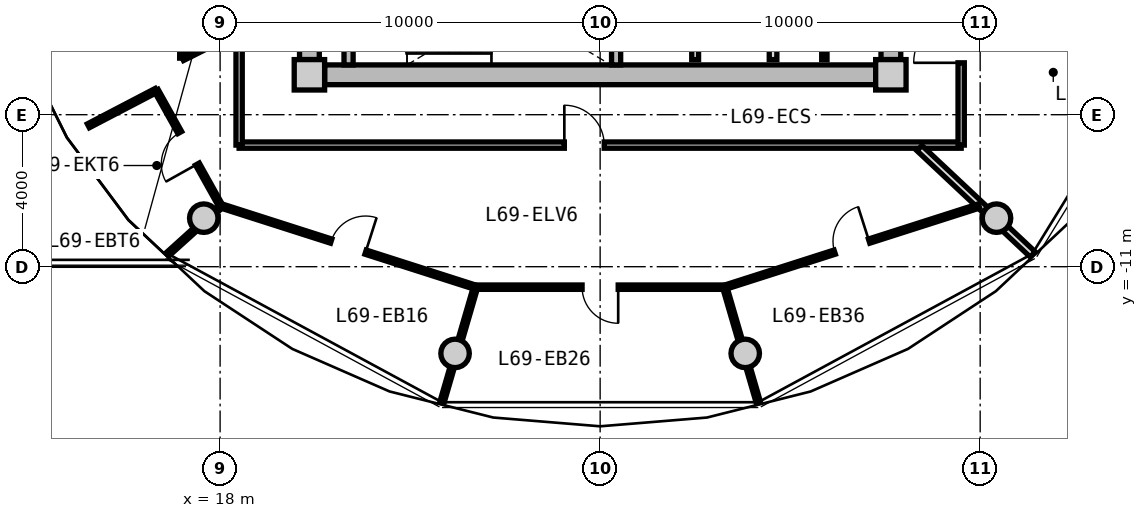
"""IFC4 building model, lengths in metres.
Left out: names, types, materials, properties, quantities, classifications, styles, units other than length and angle.
Written with IfcOpenShell. Run it as: python <this file> out.ifc"""

import sys

from ifc_helpers import new_model, si_unit, direction, frame, frame_2d, origin, origin_2d, place, context, subcontext, project, spatial, rectangle, circle, extrude, source, transform, mapped, element, fill, save


model = new_model("IFC4")
c1 = context("Model", 3, precision=1e-05, world=origin(), true_north=direction((0.0, 1.0)))
c2 = subcontext(c1, "Body", "Model", "MODEL_VIEW")
j1 = project(units=[si_unit("LENGTHUNIT", "METRE"), si_unit("PLANEANGLEUNIT", "RADIAN")], contexts=[c1])
p1 = place(None, origin())
s1 = spatial("IfcSite", under=j1, at=p1, CompositionType="ELEMENT")
p2 = place(p1, origin())
s2 = spatial("IfcBuilding", under=s1, at=p2, CompositionType="ELEMENT")
p3 = place(p2, frame((0.0, 0.0, 223.05)))
s3 = spatial("IfcBuildingStorey", under=s2, at=p3, CompositionType="ELEMENT", Elevation=223.05)
m1 = source(origin(), c2, "Body", "SweptSolid", [
    extrude(rectangle(XDim=0.8, YDim=0.8, at=origin_2d()), origin(), (0.0, 0.0, 1.0), 3.05),
])
for number, where, z_axis, x_axis in (
    (1, (20.35, -5.95, 0.0), (0.0, 0.0, 1.0), (1.0, 0.0, 0.0)),
    (2, (35.65, -5.95, 0.0), (0.0, 0.0, 1.0), (1.0, 0.0, 0.0)),
):
    element("IfcColumn", number, at=place(p3, frame(where, z_axis=z_axis, x_axis=x_axis)), inside=s3, PredefinedType="COLUMN", context=c2, shape_type="MappedRepresentation", body=[
        mapped(m1, transform((0.0, 0.0, 0.0), x_axis=(1.0, 0.0, 0.0), y_axis=(0.0, 1.0, 0.0), z_axis=(0.0, 0.0, 1.0), scale=1.0)),
    ])
m2 = source(origin(), c2, "Body", "SweptSolid", [
    extrude(rectangle(XDim=14.5, YDim=0.52, at=frame_2d((7.25, 0.0))), origin(), (0.0, 0.0, 1.0), 2.76),
])
p4 = place(p3, frame((35.25, -5.95, 0.0), z_axis=(0.0, 0.0, 1.0), x_axis=(-1.0, 0.0, 0.0)))
e3 = element("IfcWall", 3, at=p4, inside=s3, PredefinedType="SHEAR", context=c2, shape_type="MappedRepresentation", body=[
    mapped(m2, transform((0.0, 0.0, 0.0), x_axis=(1.0, 0.0, 0.0), y_axis=(0.0, 1.0, 0.0), z_axis=(0.0, 0.0, 1.0), scale=1.0)),
])
m3 = source(origin(), c2, "Body", "SweptSolid", [
    extrude(rectangle(XDim=11.1, YDim=0.52, at=frame_2d((5.55, 0.0))), origin(), (0.0, 0.0, 1.0), 2.76),
])
p5 = place(p3, frame((20.35, -5.55, 0.0), z_axis=(0.0, 0.0, 1.0), x_axis=(0.0, 1.0, 0.0)))
e4 = element("IfcWall", 4, at=p5, inside=s3, PredefinedType="SHEAR", context=c2, shape_type="MappedRepresentation", body=[
    mapped(m3, transform((0.0, 0.0, 0.0), x_axis=(1.0, 0.0, 0.0), y_axis=(0.0, 1.0, 0.0), z_axis=(0.0, 0.0, 1.0), scale=1.0)),
])
p6 = place(p5, frame((3.8, 0.0, 0.0)))
e5 = element("IfcOpeningElement", 5, at=p6, cuts=e4, PredefinedType="OPENING", context=c2, shape_type="SweptSolid", body=[
    extrude(rectangle(XDim=1.2, YDim=2.15, at=frame_2d((0.6, 1.075))), frame((0.0, 0.27, 0.0), z_axis=(0.0, -1.0, 0.0), x_axis=(1.0, 0.0, 0.0)), (0.0, 0.0, 1.0), 0.54),
])
p7 = place(p3, frame((35.65, 5.55, 0.0), z_axis=(0.0, 0.0, 1.0), x_axis=(0.0, -1.0, 0.0)))
e6 = element("IfcWall", 6, at=p7, inside=s3, PredefinedType="SHEAR", context=c2, shape_type="MappedRepresentation", body=[
    mapped(m3, transform((0.0, 0.0, 0.0), x_axis=(1.0, 0.0, 0.0), y_axis=(0.0, 1.0, 0.0), z_axis=(0.0, 0.0, 1.0), scale=1.0)),
])
p8 = place(p7, frame((5.65, 0.0, 0.0)))
e7 = element("IfcOpeningElement", 7, at=p8, cuts=e6, PredefinedType="OPENING", context=c2, shape_type="SweptSolid", body=[
    extrude(rectangle(XDim=1.2, YDim=2.15, at=frame_2d((0.6, 1.075))), frame((0.0, 0.27, 0.0), z_axis=(0.0, -1.0, 0.0), x_axis=(1.0, 0.0, 0.0)), (0.0, 0.0, 1.0), 0.54),
])
m4 = source(origin(), c2, "Body", "SweptSolid", [
    extrude(circle(Radius=0.375, at=origin_2d()), origin(), (0.0, 0.0, 1.0), 3.05),
])
for number, where, z_axis, x_axis in (
    (8, (17.57, -9.723, 0.0), (0.0, 0.0, 1.0), (1.0, 0.0, 0.0)),
    (9, (24.182, -13.281, 0.0), (0.0, 0.0, 1.0), (1.0, 0.0, 0.0)),
    (10, (31.818, -13.281, 0.0), (0.0, 0.0, 1.0), (1.0, 0.0, 0.0)),
    (11, (38.43, -9.723, 0.0), (0.0, 0.0, 1.0), (1.0, 0.0, 0.0)),
):
    element("IfcColumn", number, at=place(p3, frame(where, z_axis=z_axis, x_axis=x_axis)), inside=s3, PredefinedType="COLUMN", context=c2, shape_type="MappedRepresentation", body=[
        mapped(m4, transform((0.0, 0.0, 0.0), x_axis=(1.0, 0.0, 0.0), y_axis=(0.0, 1.0, 0.0), z_axis=(0.0, 0.0, 1.0), scale=1.0)),
    ])
m5 = source(origin(), c2, "Body", "SweptSolid", [
    extrude(rectangle(XDim=3.24, YDim=0.24, at=frame_2d((1.62, 0.0))), origin(), (0.0, 0.0, 1.0), 2.76),
])
for number, where, z_axis, x_axis in (
    (12, (21.38, -5.69, 0.0), (0.0, 0.0, 1.0), (0.0, 1.0, 0.0)),
    (13, (28.42, -5.69, 0.0), (0.0, 0.0, 1.0), (0.0, 1.0, 0.0)),
):
    element("IfcWall", number, at=place(p3, frame(where, z_axis=z_axis, x_axis=x_axis)), inside=s3, PredefinedType="PARTITIONING", context=c2, shape_type="MappedRepresentation", body=[
        mapped(m5, transform((0.0, 0.0, 0.0), x_axis=(1.0, 0.0, 0.0), y_axis=(0.0, 1.0, 0.0), z_axis=(0.0, 0.0, 1.0), scale=1.0)),
    ])
m6 = source(origin(), c2, "Body", "SweptSolid", [
    extrude(rectangle(XDim=3.8, YDim=0.2, at=frame_2d((1.9, 0.0))), origin(), (0.0, 0.0, 1.0), 2.745),
])
p9 = place(p3, frame((32.55, -5.55, 0.0), z_axis=(0.0, 0.0, 1.0), x_axis=(0.0, 1.0, 0.0)))
e14 = element("IfcWall", 14, at=p9, inside=s3, PredefinedType="PARTITIONING", context=c2, shape_type="MappedRepresentation", body=[
    mapped(m6, transform((0.0, 0.0, 0.0), x_axis=(1.0, 0.0, 0.0), y_axis=(0.0, 1.0, 0.0), z_axis=(0.0, 0.0, 1.0), scale=1.0)),
])
m7 = source(origin(), c2, "Body", "SweptSolid", [
    extrude(rectangle(XDim=4.2, YDim=0.18, at=frame_2d((2.1, 0.0))), origin(), (0.0, 0.0, 1.0), 2.745),
])
p10 = place(p3, frame((30.5, -5.55, 0.0), z_axis=(0.0, 0.0, 1.0), x_axis=(0.0, 1.0, 0.0)))
e15 = element("IfcWall", 15, at=p10, inside=s3, PredefinedType="PARTITIONING", context=c2, shape_type="MappedRepresentation", body=[
    mapped(m7, transform((0.0, 0.0, 0.0), x_axis=(1.0, 0.0, 0.0), y_axis=(0.0, 1.0, 0.0), z_axis=(0.0, 0.0, 1.0), scale=1.0)),
])
m8 = source(origin(), c2, "Body", "SweptSolid", [
    extrude(rectangle(XDim=3.8, YDim=0.14, at=frame_2d((1.9, 0.0))), origin(), (0.0, 0.0, 1.0), 2.745),
])
p11 = place(p3, frame((33.9, -5.55, 0.0), z_axis=(0.0, 0.0, 1.0), x_axis=(0.0, 1.0, 0.0)))
e16 = element("IfcWall", 16, at=p11, inside=s3, PredefinedType="PARTITIONING", context=c2, shape_type="MappedRepresentation", body=[
    mapped(m8, transform((0.0, 0.0, 0.0), x_axis=(1.0, 0.0, 0.0), y_axis=(0.0, 1.0, 0.0), z_axis=(0.0, 0.0, 1.0), scale=1.0)),
])
m9 = source(origin(), c2, "Body", "SweptSolid", [
    extrude(rectangle(XDim=19.0, YDim=0.165, at=frame_2d((9.5, 0.0))), origin(), (0.0, 0.0, 1.0), 2.745),
])
p12 = place(p3, frame((37.5, -7.8, 0.0), z_axis=(0.0, 0.0, 1.0), x_axis=(-1.0, 0.0, 0.0)))
e17 = element("IfcWall", 17, at=p12, inside=s3, PredefinedType="PARTITIONING", context=c2, shape_type="MappedRepresentation", body=[
    mapped(m9, transform((0.0, 0.0, 0.0), x_axis=(1.0, 0.0, 0.0), y_axis=(0.0, 1.0, 0.0), z_axis=(0.0, 0.0, 1.0), scale=1.0)),
])
p13 = place(p12, frame((9.392, 0.0, 0.0)))
e18 = element("IfcOpeningElement", 18, at=p13, cuts=e17, PredefinedType="OPENING", context=c2, shape_type="SweptSolid", body=[
    extrude(rectangle(XDim=1.05, YDim=2.15, at=frame_2d((0.525, 1.075))), frame((0.0, 0.093, 0.0), z_axis=(0.0, -1.0, 0.0), x_axis=(1.0, 0.0, 0.0)), (0.0, 0.0, 1.0), 0.185),
])
m10 = source(origin(), c2, "Body", "SweptSolid", [
    extrude(rectangle(XDim=6.88, YDim=0.165, at=frame_2d((3.44, 0.0))), origin(), (0.0, 0.0, 1.0), 2.745),
])
p14 = place(p3, frame((18.5, -7.8, 0.0), z_axis=(0.0, 0.0, 1.0), x_axis=(0.0, 1.0, 0.0)))
e19 = element("IfcWall", 19, at=p14, inside=s3, PredefinedType="PARTITIONING", context=c2, shape_type="MappedRepresentation", body=[
    mapped(m10, transform((0.0, 0.0, 0.0), x_axis=(1.0, 0.0, 0.0), y_axis=(0.0, 1.0, 0.0), z_axis=(0.0, 0.0, 1.0), scale=1.0)),
])
p15 = place(p3, frame((37.5, -0.92, 0.0), z_axis=(0.0, 0.0, 1.0), x_axis=(0.0, -1.0, 0.0)))
e20 = element("IfcWall", 20, at=p15, inside=s3, PredefinedType="PARTITIONING", context=c2, shape_type="MappedRepresentation", body=[
    mapped(m10, transform((0.0, 0.0, 0.0), x_axis=(1.0, 0.0, 0.0), y_axis=(0.0, 1.0, 0.0), z_axis=(0.0, 0.0, 1.0), scale=1.0)),
])
p16 = place(p15, frame((3.464, 0.0, 0.0)))
e21 = element("IfcOpeningElement", 21, at=p16, cuts=e20, PredefinedType="OPENING", context=c2, shape_type="SweptSolid", body=[
    extrude(rectangle(XDim=1.25, YDim=2.2, at=frame_2d((0.625, 1.1))), frame((0.0, 0.093, 0.0), z_axis=(0.0, -1.0, 0.0), x_axis=(1.0, 0.0, 0.0)), (0.0, 0.0, 1.0), 0.185),
])
m11 = source(origin(), c2, "Body", "SweptSolid", [
    extrude(rectangle(XDim=4.089, YDim=0.19, at=frame_2d((2.044, 0.0))), origin(), (0.0, 0.0, 1.0), 2.345),
])
p17 = place(p3, frame((36.402, -7.88, 0.0), z_axis=(0.0, 0.0, 1.0), x_axis=(0.729401273609, -0.684086092577, 0.0)))
e22 = element("IfcWall", 22, at=p17, inside=s3, PredefinedType="PARTITIONING", context=c2, shape_type="MappedRepresentation", body=[
    mapped(m11, transform((0.0, 0.0, 0.0), x_axis=(1.0, 0.0, 0.0), y_axis=(0.0, 1.0, 0.0), z_axis=(0.0, 0.0, 1.0), scale=1.0)),
])
m12 = source(origin(), c2, "Body", "SweptSolid", [
    extrude(rectangle(XDim=7.024, YDim=0.115, at=frame_2d((3.512, 0.0))), origin(), (0.0, 0.0, 1.0), 2.745),
])
p18 = place(p3, frame((18.03, -9.401, 0.0), z_axis=(0.0, 0.0, 1.0), x_axis=(0.952454006655, -0.304682400552, 0.0)))
e23 = element("IfcWall", 23, at=p18, inside=s3, PredefinedType="PARTITIONING", context=c2, shape_type="MappedRepresentation", body=[
    mapped(m12, transform((0.0, 0.0, 0.0), x_axis=(1.0, 0.0, 0.0), y_axis=(0.0, 1.0, 0.0), z_axis=(0.0, 0.0, 1.0), scale=1.0)),
])
p19 = place(p18, frame((3.037, 0.0, 0.0)))
e24 = element("IfcOpeningElement", 24, at=p19, cuts=e23, PredefinedType="OPENING", context=c2, shape_type="SweptSolid", body=[
    extrude(rectangle(XDim=0.95, YDim=2.1, at=frame_2d((0.475, 1.05))), frame((0.0, 0.067, 0.0), z_axis=(0.0, -1.0, 0.0), x_axis=(1.0, 0.0, 0.0)), (0.0, 0.0, 1.0), 0.135),
])
m13 = source(origin(), c2, "Body", "SweptSolid", [
    extrude(rectangle(XDim=1.905, YDim=0.115, at=frame_2d((0.953, 0.0))), origin(), (0.0, 0.0, 1.0), 2.345),
])
p20 = place(p3, frame((18.03, -9.401, 0.0), z_axis=(0.0, 0.0, 1.0), x_axis=(-0.742624708137, -0.669707804094, 0.0)))
e25 = element("IfcWall", 25, at=p20, inside=s3, PredefinedType="PARTITIONING", context=c2, shape_type="MappedRepresentation", body=[
    mapped(m13, transform((0.0, 0.0, 0.0), x_axis=(1.0, 0.0, 0.0), y_axis=(0.0, 1.0, 0.0), z_axis=(0.0, 0.0, 1.0), scale=1.0)),
])
m14 = source(origin(), c2, "Body", "SweptSolid", [
    extrude(rectangle(XDim=6.558, YDim=0.115, at=frame_2d((3.279, 0.0))), origin(), (0.0, 0.0, 1.0), 2.745),
])
p21 = place(p3, frame((24.721, -11.539, 0.0), z_axis=(0.0, 0.0, 1.0), x_axis=(1.0, 0.0, 0.0)))
e26 = element("IfcWall", 26, at=p21, inside=s3, PredefinedType="PARTITIONING", context=c2, shape_type="MappedRepresentation", body=[
    mapped(m14, transform((0.0, 0.0, 0.0), x_axis=(1.0, 0.0, 0.0), y_axis=(0.0, 1.0, 0.0), z_axis=(0.0, 0.0, 1.0), scale=1.0)),
])
p22 = place(p21, frame((2.804, 0.0, 0.0)))
e27 = element("IfcOpeningElement", 27, at=p22, cuts=e26, PredefinedType="OPENING", context=c2, shape_type="SweptSolid", body=[
    extrude(rectangle(XDim=0.95, YDim=2.1, at=frame_2d((0.475, 1.05))), frame((0.0, 0.067, 0.0), z_axis=(0.0, -1.0, 0.0), x_axis=(1.0, 0.0, 0.0)), (0.0, 0.0, 1.0), 0.135),
])
m15 = source(origin(), c2, "Body", "SweptSolid", [
    extrude(rectangle(XDim=3.173, YDim=0.115, at=frame_2d((1.587, 0.0))), origin(), (0.0, 0.0, 1.0), 2.345),
])
p23 = place(p3, frame((24.721, -11.539, 0.0), z_axis=(0.0, 0.0, 1.0), x_axis=(-0.279878875918, -0.960035319566, 0.0)))
e28 = element("IfcWall", 28, at=p23, inside=s3, PredefinedType="PARTITIONING", context=c2, shape_type="MappedRepresentation", body=[
    mapped(m15, transform((0.0, 0.0, 0.0), x_axis=(1.0, 0.0, 0.0), y_axis=(0.0, 1.0, 0.0), z_axis=(0.0, 0.0, 1.0), scale=1.0)),
])
p24 = place(p3, frame((31.28, -11.542, 0.0), z_axis=(0.0, 0.0, 1.0), x_axis=(0.952454006655, 0.304682400552, 0.0)))
e29 = element("IfcWall", 29, at=p24, inside=s3, PredefinedType="PARTITIONING", context=c2, shape_type="MappedRepresentation", body=[
    mapped(m12, transform((0.0, 0.0, 0.0), x_axis=(1.0, 0.0, 0.0), y_axis=(0.0, 1.0, 0.0), z_axis=(0.0, 0.0, 1.0), scale=1.0)),
])
p25 = place(p24, frame((3.037, 0.0, 0.0)))
e30 = element("IfcOpeningElement", 30, at=p25, cuts=e29, PredefinedType="OPENING", context=c2, shape_type="SweptSolid", body=[
    extrude(rectangle(XDim=0.95, YDim=2.1, at=frame_2d((0.475, 1.05))), frame((0.0, 0.067, 0.0), z_axis=(0.0, -1.0, 0.0), x_axis=(1.0, 0.0, 0.0)), (0.0, 0.0, 1.0), 0.135),
])
m16 = source(origin(), c2, "Body", "SweptSolid", [
    extrude(rectangle(XDim=3.171, YDim=0.115, at=frame_2d((1.585, 0.0))), origin(), (0.0, 0.0, 1.0), 2.345),
])
p26 = place(p3, frame((31.28, -11.542, 0.0), z_axis=(0.0, 0.0, 1.0), x_axis=(0.279893554029, -0.960031040338, 0.0)))
e31 = element("IfcWall", 31, at=p26, inside=s3, PredefinedType="PARTITIONING", context=c2, shape_type="MappedRepresentation", body=[
    mapped(m16, transform((0.0, 0.0, 0.0), x_axis=(1.0, 0.0, 0.0), y_axis=(0.0, 1.0, 0.0), z_axis=(0.0, 0.0, 1.0), scale=1.0)),
])
m17 = source(origin(), c2, "Body", "SweptSolid", [
    extrude(rectangle(XDim=1.638, YDim=0.14, at=frame_2d((0.819, 0.0))), origin(), (0.0, 0.0, 1.0), 2.745),
])
p27 = place(p3, frame((18.47, -4.778, 0.0), z_axis=(0.0, 0.0, 1.0), x_axis=(-0.893919977945, -0.448226586707, 0.0)))
e32 = element("IfcWall", 32, at=p27, inside=s3, PredefinedType="PARTITIONING", context=c2, shape_type="MappedRepresentation", body=[
    mapped(m17, transform((0.0, 0.0, 0.0), x_axis=(1.0, 0.0, 0.0), y_axis=(0.0, 1.0, 0.0), z_axis=(0.0, 0.0, 1.0), scale=1.0)),
])
m18 = source(origin(), c2, "Body", "SweptSolid", [
    extrude(rectangle(XDim=2.759, YDim=0.14, at=frame_2d((1.379, 0.0))), origin(), (0.0, 0.0, 1.0), 2.745),
])
p28 = place(p3, frame((17.005, -5.513, 0.0), z_axis=(0.0, 0.0, 1.0), x_axis=(0.01194710728, 0.999928630767, 0.0)))
e33 = element("IfcWall", 33, at=p28, inside=s3, PredefinedType="PARTITIONING", context=c2, shape_type="MappedRepresentation", body=[
    mapped(m18, transform((0.0, 0.0, 0.0), x_axis=(1.0, 0.0, 0.0), y_axis=(0.0, 1.0, 0.0), z_axis=(0.0, 0.0, 1.0), scale=1.0)),
])
p29 = place(p28, frame((0.919, 0.0, 0.0)))
e34 = element("IfcOpeningElement", 34, at=p29, cuts=e33, PredefinedType="OPENING", context=c2, shape_type="SweptSolid", body=[
    extrude(rectangle(XDim=0.92, YDim=2.1, at=frame_2d((0.46, 1.05))), frame((0.0, 0.08, 0.0), z_axis=(0.0, -1.0, 0.0), x_axis=(1.0, 0.0, 0.0)), (0.0, 0.0, 1.0), 0.16),
])
m19 = source(origin(), c2, "Body", "SweptSolid", [
    extrude(rectangle(XDim=2.015, YDim=0.115, at=frame_2d((1.007, 0.0))), origin(), (0.0, 0.0, 1.0), 2.745),
])
p30 = place(p3, frame((16.318, -6.36, 0.0), z_axis=(0.0, 0.0, 1.0), x_axis=(-0.886437892009, -0.462847559797, 0.0)))
e35 = element("IfcWall", 35, at=p30, inside=s3, PredefinedType="PARTITIONING", context=c2, shape_type="MappedRepresentation", body=[
    mapped(m19, transform((0.0, 0.0, 0.0), x_axis=(1.0, 0.0, 0.0), y_axis=(0.0, 1.0, 0.0), z_axis=(0.0, 0.0, 1.0), scale=1.0)),
])
m20 = source(origin(), c2, "Body", "SweptSolid", [
    extrude(rectangle(XDim=3.493, YDim=0.115, at=frame_2d((1.746, 0.0))), origin(), (0.0, 0.0, 1.0), 2.745),
])
p31 = place(p3, frame((16.318, -6.36, 0.0), z_axis=(0.0, 0.0, 1.0), x_axis=(0.487896553961, -0.872901456427, 0.0)))
e36 = element("IfcWall", 36, at=p31, inside=s3, PredefinedType="PARTITIONING", context=c2, shape_type="MappedRepresentation", body=[
    mapped(m20, transform((0.0, 0.0, 0.0), x_axis=(1.0, 0.0, 0.0), y_axis=(0.0, 1.0, 0.0), z_axis=(0.0, 0.0, 1.0), scale=1.0)),
])
p32 = place(p31, frame((1.271, 0.0, 0.0)))
e37 = element("IfcOpeningElement", 37, at=p32, cuts=e36, PredefinedType="OPENING", context=c2, shape_type="SweptSolid", body=[
    extrude(rectangle(XDim=0.95, YDim=2.1, at=frame_2d((0.475, 1.05))), frame((0.0, 0.067, 0.0), z_axis=(0.0, -1.0, 0.0), x_axis=(1.0, 0.0, 0.0)), (0.0, 0.0, 1.0), 0.135),
])
m21 = source(origin(), c2, "Body", "SweptSolid", [
    extrude(rectangle(XDim=1.05, YDim=2.15, at=frame_2d((0.525, 1.075))), frame((0.0, 0.025, 0.0), z_axis=(0.0, -1.0, 0.0), x_axis=(1.0, 0.0, 0.0)), (0.0, 0.0, 1.0), 0.05),
])
p33 = place(p13, frame((1.05, 0.0, 0.0), z_axis=(0.0, 0.0, 1.0), x_axis=(-1.0, 0.0, 0.0)))
e38 = element("IfcDoor", 38, at=p33, inside=s3, OperationType="SINGLE_SWING_LEFT", PredefinedType="DOOR", context=c2, shape_type="MappedRepresentation", body=[
    mapped(m21, transform((0.0, 0.0, 0.0), x_axis=(1.0, 0.0, 0.0), y_axis=(0.0, 1.0, 0.0), z_axis=(0.0, 0.0, 1.0), scale=1.0)),
])
fill(e18, e38)
m22 = source(origin(), c2, "Body", "SweptSolid", [
    extrude(rectangle(XDim=0.95, YDim=2.1, at=frame_2d((0.475, 1.05))), frame((0.0, 0.025, 0.0), z_axis=(0.0, -1.0, 0.0), x_axis=(1.0, 0.0, 0.0)), (0.0, 0.0, 1.0), 0.05),
])
p34 = place(p32, frame((0.95, 0.0, 0.0), z_axis=(0.0, 0.0, 1.0), x_axis=(-1.0, 0.0, 0.0)))
e39 = element("IfcDoor", 39, at=p34, inside=s3, OperationType="SINGLE_SWING_LEFT", PredefinedType="DOOR", context=c2, shape_type="MappedRepresentation", body=[
    mapped(m22, transform((0.0, 0.0, 0.0), x_axis=(1.0, 0.0, 0.0), y_axis=(0.0, 1.0, 0.0), z_axis=(0.0, 0.0, 1.0), scale=1.0)),
])
fill(e37, e39)
p35 = place(p19, origin())
e40 = element("IfcDoor", 40, at=p35, inside=s3, OperationType="SINGLE_SWING_RIGHT", PredefinedType="DOOR", context=c2, shape_type="MappedRepresentation", body=[
    mapped(m22, transform((0.0, 0.0, 0.0), x_axis=(1.0, 0.0, 0.0), y_axis=(0.0, 1.0, 0.0), z_axis=(0.0, 0.0, 1.0), scale=1.0)),
])
fill(e24, e40)
p36 = place(p22, frame((0.95, 0.0, 0.0), z_axis=(0.0, 0.0, 1.0), x_axis=(-1.0, 0.0, 0.0)))
e41 = element("IfcDoor", 41, at=p36, inside=s3, OperationType="SINGLE_SWING_LEFT", PredefinedType="DOOR", context=c2, shape_type="MappedRepresentation", body=[
    mapped(m22, transform((0.0, 0.0, 0.0), x_axis=(1.0, 0.0, 0.0), y_axis=(0.0, 1.0, 0.0), z_axis=(0.0, 0.0, 1.0), scale=1.0)),
])
fill(e27, e41)
p37 = place(p25, origin())
e42 = element("IfcDoor", 42, at=p37, inside=s3, OperationType="SINGLE_SWING_RIGHT", PredefinedType="DOOR", context=c2, shape_type="MappedRepresentation", body=[
    mapped(m22, transform((0.0, 0.0, 0.0), x_axis=(1.0, 0.0, 0.0), y_axis=(0.0, 1.0, 0.0), z_axis=(0.0, 0.0, 1.0), scale=1.0)),
])
fill(e30, e42)
m23 = source(origin(), c2, "Body", "SweptSolid", [
    extrude(rectangle(XDim=1.25, YDim=2.2, at=frame_2d((0.625, 1.1))), frame((0.0, 0.025, 0.0), z_axis=(0.0, -1.0, 0.0), x_axis=(1.0, 0.0, 0.0)), (0.0, 0.0, 1.0), 0.05),
])
p38 = place(p16, frame((1.25, 0.0, 0.0), z_axis=(0.0, 0.0, 1.0), x_axis=(-1.0, 0.0, 0.0)))
e43 = element("IfcDoor", 43, at=p38, inside=s3, OperationType="SINGLE_SWING_LEFT", PredefinedType="DOOR", context=c2, shape_type="MappedRepresentation", body=[
    mapped(m23, transform((0.0, 0.0, 0.0), x_axis=(1.0, 0.0, 0.0), y_axis=(0.0, 1.0, 0.0), z_axis=(0.0, 0.0, 1.0), scale=1.0)),
])
fill(e21, e43)
save(model, sys.argv[1])
